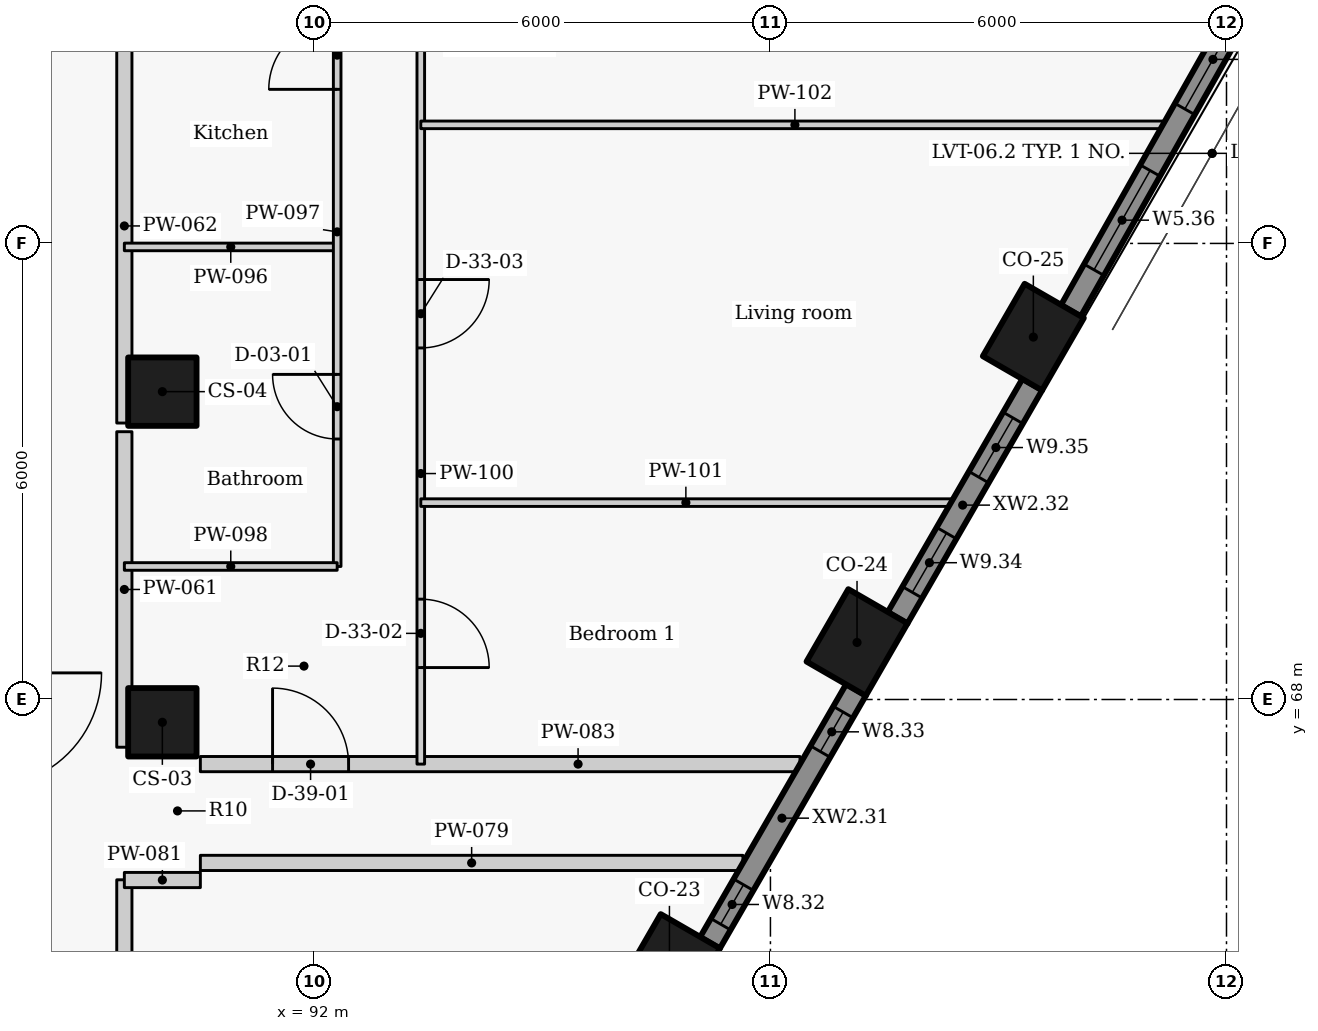
"""IFC4 building model, lengths in metres.
Left out: names, types, materials, properties, quantities, classifications, styles, units other than length and angle.
Written with IfcOpenShell. Run it as: python <this file> out.ifc"""

import sys

from ifc_helpers import new_model, si_unit, direction, frame, frame_2d, origin, origin_2d, place, context, subcontext, project, spatial, rectangle, extrude, element, fill, save


model = new_model("IFC4")
c1 = context("Model", 3, precision=1e-05, world=origin(), true_north=direction((0.0, 1.0)))
c2 = subcontext(c1, "Body", "Model", "MODEL_VIEW")
j1 = project(units=[si_unit("LENGTHUNIT", "METRE"), si_unit("PLANEANGLEUNIT", "RADIAN")], contexts=[c1])
p1 = place(None, origin())
s1 = spatial("IfcSite", under=j1, at=p1, CompositionType="ELEMENT")
p2 = place(p1, origin())
s2 = spatial("IfcBuilding", under=s1, at=p2, CompositionType="ELEMENT")
p3 = place(p2, frame((0.0, 0.0, 269.1)))
s3 = spatial("IfcBuildingStorey", under=s2, at=p3, CompositionType="ELEMENT", Elevation=269.1)
for number, where, z_axis, x_axis in (
    (1, (96.671, 64.475, 0.0), (0.0, 0.0, 1.0), (0.5, 0.866, 0.0)),
    (2, (99.139, 68.75, 0.0), (0.0, 0.0, 1.0), (0.5, 0.866, 0.0)),
    (3, (101.459, 72.768, 0.0), (0.0, 0.0, 1.0), (0.5, 0.866, 0.0)),
):
    element("IfcColumn", number, at=place(p3, frame(where, z_axis=z_axis, x_axis=x_axis)), inside=s3, PredefinedType="COLUMN", context=c2, shape_type="SweptSolid", body=[
        extrude(rectangle(XDim=1.1, YDim=0.9, at=origin_2d()), origin(), (0.0, 0.0, 1.0), 3.3),
    ])
for number, where, z_axis, x_axis in (
    (4, (90.0, 67.7, 0.0), (0.0, 0.0, 1.0), (0.0, 1.0, 0.0)),
    (5, (90.0, 72.05, 0.0), (0.0, 0.0, 1.0), (0.0, 1.0, 0.0)),
):
    element("IfcColumn", number, at=place(p3, frame(where, z_axis=z_axis, x_axis=x_axis)), inside=s3, PredefinedType="COLUMN", context=c2, shape_type="SweptSolid", body=[
        extrude(rectangle(XDim=0.9, YDim=0.9, at=origin_2d()), origin(), (0.0, 0.0, 1.0), 3.3),
    ])
p4 = place(p3, frame((97.204, 64.798, 0.0), z_axis=(0.0, 0.0, 1.0), x_axis=(0.499984490703, 0.866034357896, 0.0)))
e6 = element("IfcWall", 6, at=p4, inside=s3, PredefinedType="SOLIDWALL", context=c2, shape_type="SweptSolid", body=[
    extrude(rectangle(XDim=3.844, YDim=0.3, at=frame_2d((1.922, 0.0))), origin(), (0.0, 0.0, 1.0), 2.125),
])
p5 = place(p4, frame((0.283, 0.0, 0.9)))
e7 = element("IfcOpeningElement", 7, at=p5, cuts=e6, PredefinedType="OPENING", context=c2, shape_type="SweptSolid", body=[
    extrude(rectangle(XDim=0.6, YDim=1.1, at=frame_2d((0.3, 0.55))), frame((0.0, 0.16, 0.0), z_axis=(0.0, -1.0, 0.0), x_axis=(1.0, 0.0, 0.0)), (0.0, 0.0, 1.0), 0.32),
])
p6 = place(p4, frame((2.906, 0.0, 0.9)))
e8 = element("IfcOpeningElement", 8, at=p6, cuts=e6, PredefinedType="OPENING", context=c2, shape_type="SweptSolid", body=[
    extrude(rectangle(XDim=0.6, YDim=1.1, at=frame_2d((0.3, 0.55))), frame((0.0, 0.16, 0.0), z_axis=(0.0, -1.0, 0.0), x_axis=(1.0, 0.0, 0.0)), (0.0, 0.0, 1.0), 0.32),
])
p7 = place(p3, frame((99.672, 69.073, 0.0), z_axis=(0.0, 0.0, 1.0), x_axis=(0.500010404316, 0.866019396766, 0.0)))
e9 = element("IfcWall", 9, at=p7, inside=s3, PredefinedType="SOLIDWALL", context=c2, shape_type="SweptSolid", body=[
    extrude(rectangle(XDim=3.547, YDim=0.3, at=frame_2d((1.774, 0.0))), origin(), (0.0, 0.0, 1.0), 2.125),
])
p8 = place(p7, frame((0.389, 0.0, 0.9)))
e10 = element("IfcOpeningElement", 10, at=p8, cuts=e9, PredefinedType="OPENING", context=c2, shape_type="SweptSolid", body=[
    extrude(rectangle(XDim=0.9, YDim=1.1, at=frame_2d((0.45, 0.55))), frame((0.0, 0.16, 0.0), z_axis=(0.0, -1.0, 0.0), x_axis=(1.0, 0.0, 0.0)), (0.0, 0.0, 1.0), 0.32),
])
p9 = place(p7, frame((2.138, 0.0, 0.9)))
e11 = element("IfcOpeningElement", 11, at=p9, cuts=e9, PredefinedType="OPENING", context=c2, shape_type="SweptSolid", body=[
    extrude(rectangle(XDim=0.9, YDim=1.1, at=frame_2d((0.45, 0.55))), frame((0.0, 0.16, 0.0), z_axis=(0.0, -1.0, 0.0), x_axis=(1.0, 0.0, 0.0)), (0.0, 0.0, 1.0), 0.32),
])
p10 = place(p3, frame((101.952, 73.114, 0.0), z_axis=(0.0, 0.0, 1.0), x_axis=(0.492080931903, 0.870549456641, 0.0)))
e12 = element("IfcWall", 12, at=p10, inside=s3, PredefinedType="SOLIDWALL", context=c2, shape_type="SweptSolid", body=[
    extrude(rectangle(XDim=5.437, YDim=0.3, at=frame_2d((2.718, 0.0))), origin(), (0.0, 0.0, 1.0), 2.125),
])
p11 = place(p10, frame((0.62, 0.0, 0.9)))
e13 = element("IfcOpeningElement", 13, at=p11, cuts=e12, PredefinedType="OPENING", context=c2, shape_type="SweptSolid", body=[
    extrude(rectangle(XDim=1.5, YDim=1.1, at=frame_2d((0.75, 0.55))), frame((0.0, 0.16, 0.0), z_axis=(0.0, -1.0, 0.0), x_axis=(1.0, 0.0, 0.0)), (0.0, 0.0, 1.0), 0.32),
])
p12 = place(p10, frame((3.05, 0.0, 0.9)))
e14 = element("IfcOpeningElement", 14, at=p12, cuts=e12, PredefinedType="OPENING", context=c2, shape_type="SweptSolid", body=[
    extrude(rectangle(XDim=1.5, YDim=1.1, at=frame_2d((0.75, 0.55))), frame((0.0, 0.16, 0.0), z_axis=(0.0, -1.0, 0.0), x_axis=(1.0, 0.0, 0.0)), (0.0, 0.0, 1.0), 0.32),
])
p13 = place(p3, frame((89.5, 62.937, 0.0), z_axis=(0.0, 0.0, 1.0), x_axis=(0.0, 1.0, 0.0)))
e15 = element("IfcWall", 15, at=p13, inside=s3, PredefinedType="PARTITIONING", context=c2, shape_type="SweptSolid", body=[
    extrude(rectangle(XDim=2.691, YDim=0.2, at=frame_2d((1.345, 0.0))), origin(), (0.0, 0.0, 1.0), 3.025),
])
p14 = place(p3, frame((89.5, 67.372, 0.0), z_axis=(0.0, 0.0, 1.0), x_axis=(0.0, 1.0, 0.0)))
e16 = element("IfcWall", 16, at=p14, inside=s3, PredefinedType="PARTITIONING", context=c2, shape_type="SweptSolid", body=[
    extrude(rectangle(XDim=4.151, YDim=0.2, at=frame_2d((2.075, 0.0))), origin(), (0.0, 0.0, 1.0), 3.025),
])
p15 = place(p3, frame((89.5, 71.637, 0.0), z_axis=(0.0, 0.0, 1.0), x_axis=(0.0, 1.0, 0.0)))
e17 = element("IfcWall", 17, at=p15, inside=s3, PredefinedType="PARTITIONING", context=c2, shape_type="SweptSolid", body=[
    extrude(rectangle(XDim=5.186, YDim=0.2, at=frame_2d((2.593, 0.0))), origin(), (0.0, 0.0, 1.0), 3.025),
])
p16 = place(p3, frame((90.5, 65.85, 0.0), z_axis=(0.0, 0.0, 1.0), x_axis=(1.0, 0.0, 0.0)))
e18 = element("IfcWall", 18, at=p16, inside=s3, PredefinedType="PARTITIONING", context=c2, shape_type="SweptSolid", body=[
    extrude(rectangle(XDim=7.138, YDim=0.2, at=frame_2d((3.569, 0.0))), origin(), (0.0, 0.0, 1.0), 2.105),
])
p17 = place(p3, frame((89.5, 65.625, 0.0), z_axis=(0.0, 0.0, 1.0), x_axis=(1.0, 0.0, 0.0)))
e19 = element("IfcWall", 19, at=p17, inside=s3, PredefinedType="PARTITIONING", context=c2, shape_type="SweptSolid", body=[
    extrude(rectangle(XDim=1.0, YDim=0.2, at=frame_2d((0.5, 0.0))), origin(), (0.0, 0.0, 1.0), 2.505),
])
p18 = place(p3, frame((90.5, 67.15, 0.0), z_axis=(0.0, 0.0, 1.0), x_axis=(1.0, 0.0, 0.0)))
e20 = element("IfcWall", 20, at=p18, inside=s3, PredefinedType="PARTITIONING", context=c2, shape_type="SweptSolid", body=[
    extrude(rectangle(XDim=7.889, YDim=0.2, at=frame_2d((3.944, 0.0))), origin(), (0.0, 0.0, 1.0), 2.105),
])
p19 = place(p18, frame((0.95, 0.0, 0.0)))
e21 = element("IfcOpeningElement", 21, at=p19, cuts=e20, PredefinedType="OPENING", context=c2, shape_type="SweptSolid", body=[
    extrude(rectangle(XDim=1.0, YDim=2.085, at=frame_2d((0.5, 1.042))), frame((0.0, 0.11, 0.0), z_axis=(0.0, -1.0, 0.0), x_axis=(1.0, 0.0, 0.0)), (0.0, 0.0, 1.0), 0.22),
])
p20 = place(p3, frame((89.5, 73.954, 0.0), z_axis=(0.0, 0.0, 1.0), x_axis=(1.0, 0.0, 0.0)))
e22 = element("IfcWall", 22, at=p20, inside=s3, PredefinedType="PARTITIONING", context=c2, shape_type="SweptSolid", body=[
    extrude(rectangle(XDim=2.8, YDim=0.1, at=frame_2d((1.4, 0.0))), origin(), (0.0, 0.0, 1.0), 2.505),
])
p21 = place(p3, frame((92.3, 69.75, 0.0), z_axis=(0.0, 0.0, 1.0), x_axis=(0.0, 1.0, 0.0)))
e23 = element("IfcWall", 23, at=p21, inside=s3, PredefinedType="PARTITIONING", context=c2, shape_type="SweptSolid", body=[
    extrude(rectangle(XDim=9.25, YDim=0.1, at=frame_2d((4.625, 0.0))), origin(), (0.0, 0.0, 1.0), 3.025),
])
p22 = place(p21, frame((1.677, 0.0, 0.0)))
e24 = element("IfcOpeningElement", 24, at=p22, cuts=e23, PredefinedType="OPENING", context=c2, shape_type="SweptSolid", body=[
    extrude(rectangle(XDim=0.85, YDim=2.1, at=frame_2d((0.425, 1.05))), frame((0.0, 0.06, 0.0), z_axis=(0.0, -1.0, 0.0), x_axis=(1.0, 0.0, 0.0)), (0.0, 0.0, 1.0), 0.12),
])
p23 = place(p21, frame((6.277, 0.0, 0.0)))
e25 = element("IfcOpeningElement", 25, at=p23, cuts=e23, PredefinedType="OPENING", context=c2, shape_type="SweptSolid", body=[
    extrude(rectangle(XDim=0.9, YDim=2.1, at=frame_2d((0.45, 1.05))), frame((0.0, 0.06, 0.0), z_axis=(0.0, -1.0, 0.0), x_axis=(1.0, 0.0, 0.0)), (0.0, 0.0, 1.0), 0.12),
])
p24 = place(p3, frame((89.5, 69.75, 0.0), z_axis=(0.0, 0.0, 1.0), x_axis=(1.0, 0.0, 0.0)))
e26 = element("IfcWall", 26, at=p24, inside=s3, PredefinedType="PARTITIONING", context=c2, shape_type="SweptSolid", body=[
    extrude(rectangle(XDim=2.8, YDim=0.1, at=frame_2d((1.4, 0.0))), origin(), (0.0, 0.0, 1.0), 2.505),
])
p25 = place(p3, frame((93.4, 79.0, 0.0), z_axis=(0.0, 0.0, 1.0), x_axis=(0.0, -1.0, 0.0)))
e27 = element("IfcWall", 27, at=p25, inside=s3, PredefinedType="PARTITIONING", context=c2, shape_type="SweptSolid", body=[
    extrude(rectangle(XDim=11.85, YDim=0.1, at=frame_2d((5.925, 0.0))), origin(), (0.0, 0.0, 1.0), 3.025),
])
p26 = place(p25, frame((9.68, 0.0, 0.0)))
e28 = element("IfcOpeningElement", 28, at=p26, cuts=e27, PredefinedType="OPENING", context=c2, shape_type="SweptSolid", body=[
    extrude(rectangle(XDim=0.9, YDim=2.1, at=frame_2d((0.45, 1.05))), frame((0.0, 0.06, 0.0), z_axis=(0.0, -1.0, 0.0), x_axis=(1.0, 0.0, 0.0)), (0.0, 0.0, 1.0), 0.12),
])
p27 = place(p25, frame((5.475, 0.0, 0.0)))
e29 = element("IfcOpeningElement", 29, at=p27, cuts=e27, PredefinedType="OPENING", context=c2, shape_type="SweptSolid", body=[
    extrude(rectangle(XDim=0.9, YDim=2.1, at=frame_2d((0.45, 1.05))), frame((0.0, 0.06, 0.0), z_axis=(0.0, -1.0, 0.0), x_axis=(1.0, 0.0, 0.0)), (0.0, 0.0, 1.0), 0.12),
])
p28 = place(p25, frame((1.27, 0.0, 0.0)))
e30 = element("IfcOpeningElement", 30, at=p28, cuts=e27, PredefinedType="OPENING", context=c2, shape_type="SweptSolid", body=[
    extrude(rectangle(XDim=0.9, YDim=2.1, at=frame_2d((0.45, 1.05))), frame((0.0, 0.06, 0.0), z_axis=(0.0, -1.0, 0.0), x_axis=(1.0, 0.0, 0.0)), (0.0, 0.0, 1.0), 0.12),
])
p29 = place(p3, frame((93.4, 70.59, 0.0), z_axis=(0.0, 0.0, 1.0), x_axis=(1.0, 0.0, 0.0)))
e31 = element("IfcWall", 31, at=p29, inside=s3, PredefinedType="PARTITIONING", context=c2, shape_type="SweptSolid", body=[
    extrude(rectangle(XDim=6.975, YDim=0.1, at=frame_2d((3.488, 0.0))), origin(), (0.0, 0.0, 1.0), 2.105),
])
p30 = place(p3, frame((93.4, 75.56, 0.0), z_axis=(0.0, 0.0, 1.0), x_axis=(1.0, 0.0, 0.0)))
e32 = element("IfcWall", 32, at=p30, inside=s3, PredefinedType="PARTITIONING", context=c2, shape_type="SweptSolid", body=[
    extrude(rectangle(XDim=9.844, YDim=0.1, at=frame_2d((4.922, 0.0))), origin(), (0.0, 0.0, 1.0), 2.105),
])
p31 = place(p5, origin())
e33 = element("IfcWindow", 33, at=p31, inside=s3, PartitioningType="SINGLE_PANEL", PredefinedType="WINDOW", context=c2, shape_type="SweptSolid", body=[
    extrude(rectangle(XDim=0.6, YDim=1.1, at=frame_2d((0.3, 0.55))), frame((0.0, 0.03, 0.0), z_axis=(0.0, -1.0, 0.0), x_axis=(1.0, 0.0, 0.0)), (0.0, 0.0, 1.0), 0.06),
])
fill(e7, e33)
p32 = place(p6, origin())
e34 = element("IfcWindow", 34, at=p32, inside=s3, PartitioningType="SINGLE_PANEL", PredefinedType="WINDOW", context=c2, shape_type="SweptSolid", body=[
    extrude(rectangle(XDim=0.6, YDim=1.1, at=frame_2d((0.3, 0.55))), frame((0.0, 0.03, 0.0), z_axis=(0.0, -1.0, 0.0), x_axis=(1.0, 0.0, 0.0)), (0.0, 0.0, 1.0), 0.06),
])
fill(e8, e34)
p33 = place(p8, origin())
e35 = element("IfcWindow", 35, at=p33, inside=s3, PartitioningType="SINGLE_PANEL", PredefinedType="WINDOW", context=c2, shape_type="SweptSolid", body=[
    extrude(rectangle(XDim=0.9, YDim=1.1, at=frame_2d((0.45, 0.55))), frame((0.0, 0.03, 0.0), z_axis=(0.0, -1.0, 0.0), x_axis=(1.0, 0.0, 0.0)), (0.0, 0.0, 1.0), 0.06),
])
fill(e10, e35)
p34 = place(p9, origin())
e36 = element("IfcWindow", 36, at=p34, inside=s3, PartitioningType="SINGLE_PANEL", PredefinedType="WINDOW", context=c2, shape_type="SweptSolid", body=[
    extrude(rectangle(XDim=0.9, YDim=1.1, at=frame_2d((0.45, 0.55))), frame((0.0, 0.03, 0.0), z_axis=(0.0, -1.0, 0.0), x_axis=(1.0, 0.0, 0.0)), (0.0, 0.0, 1.0), 0.06),
])
fill(e11, e36)
p35 = place(p11, origin())
e37 = element("IfcWindow", 37, at=p35, inside=s3, PartitioningType="SINGLE_PANEL", PredefinedType="WINDOW", context=c2, shape_type="SweptSolid", body=[
    extrude(rectangle(XDim=1.5, YDim=1.1, at=frame_2d((0.75, 0.55))), frame((0.0, 0.03, 0.0), z_axis=(0.0, -1.0, 0.0), x_axis=(1.0, 0.0, 0.0)), (0.0, 0.0, 1.0), 0.06),
])
fill(e13, e37)
p36 = place(p12, origin())
e38 = element("IfcWindow", 38, at=p36, inside=s3, PartitioningType="SINGLE_PANEL", PredefinedType="WINDOW", context=c2, shape_type="SweptSolid", body=[
    extrude(rectangle(XDim=1.5, YDim=1.1, at=frame_2d((0.75, 0.55))), frame((0.0, 0.03, 0.0), z_axis=(0.0, -1.0, 0.0), x_axis=(1.0, 0.0, 0.0)), (0.0, 0.0, 1.0), 0.06),
])
fill(e14, e38)
p37 = place(p19, origin())
e39 = element("IfcDoor", 39, at=p37, inside=s3, OperationType="SINGLE_SWING_LEFT", PredefinedType="DOOR", context=c2, shape_type="SweptSolid", body=[
    extrude(rectangle(XDim=1.0, YDim=2.085, at=frame_2d((0.5, 1.042))), frame((0.0, 0.025, 0.0), z_axis=(0.0, -1.0, 0.0), x_axis=(1.0, 0.0, 0.0)), (0.0, 0.0, 1.0), 0.05),
])
fill(e21, e39)
p38 = place(p22, origin())
e40 = element("IfcDoor", 40, at=p38, inside=s3, OperationType="SINGLE_SWING_RIGHT", PredefinedType="DOOR", context=c2, shape_type="SweptSolid", body=[
    extrude(rectangle(XDim=0.85, YDim=2.1, at=frame_2d((0.425, 1.05))), frame((0.0, 0.025, 0.0), z_axis=(0.0, -1.0, 0.0), x_axis=(1.0, 0.0, 0.0)), (0.0, 0.0, 1.0), 0.05),
])
fill(e24, e40)
p39 = place(p23, origin())
e41 = element("IfcDoor", 41, at=p39, inside=s3, OperationType="SINGLE_SWING_LEFT", PredefinedType="DOOR", context=c2, shape_type="SweptSolid", body=[
    extrude(rectangle(XDim=0.9, YDim=2.1, at=frame_2d((0.45, 1.05))), frame((0.0, 0.025, 0.0), z_axis=(0.0, -1.0, 0.0), x_axis=(1.0, 0.0, 0.0)), (0.0, 0.0, 1.0), 0.05),
])
fill(e25, e41)
p40 = place(p26, origin())
e42 = element("IfcDoor", 42, at=p40, inside=s3, OperationType="SINGLE_SWING_RIGHT", PredefinedType="DOOR", context=c2, shape_type="SweptSolid", body=[
    extrude(rectangle(XDim=0.9, YDim=2.1, at=frame_2d((0.45, 1.05))), frame((0.0, 0.025, 0.0), z_axis=(0.0, -1.0, 0.0), x_axis=(1.0, 0.0, 0.0)), (0.0, 0.0, 1.0), 0.05),
])
fill(e28, e42)
p41 = place(p27, origin())
e43 = element("IfcDoor", 43, at=p41, inside=s3, OperationType="SINGLE_SWING_LEFT", PredefinedType="DOOR", context=c2, shape_type="SweptSolid", body=[
    extrude(rectangle(XDim=0.9, YDim=2.1, at=frame_2d((0.45, 1.05))), frame((0.0, 0.025, 0.0), z_axis=(0.0, -1.0, 0.0), x_axis=(1.0, 0.0, 0.0)), (0.0, 0.0, 1.0), 0.05),
])
fill(e29, e43)
save(model, sys.argv[1])
